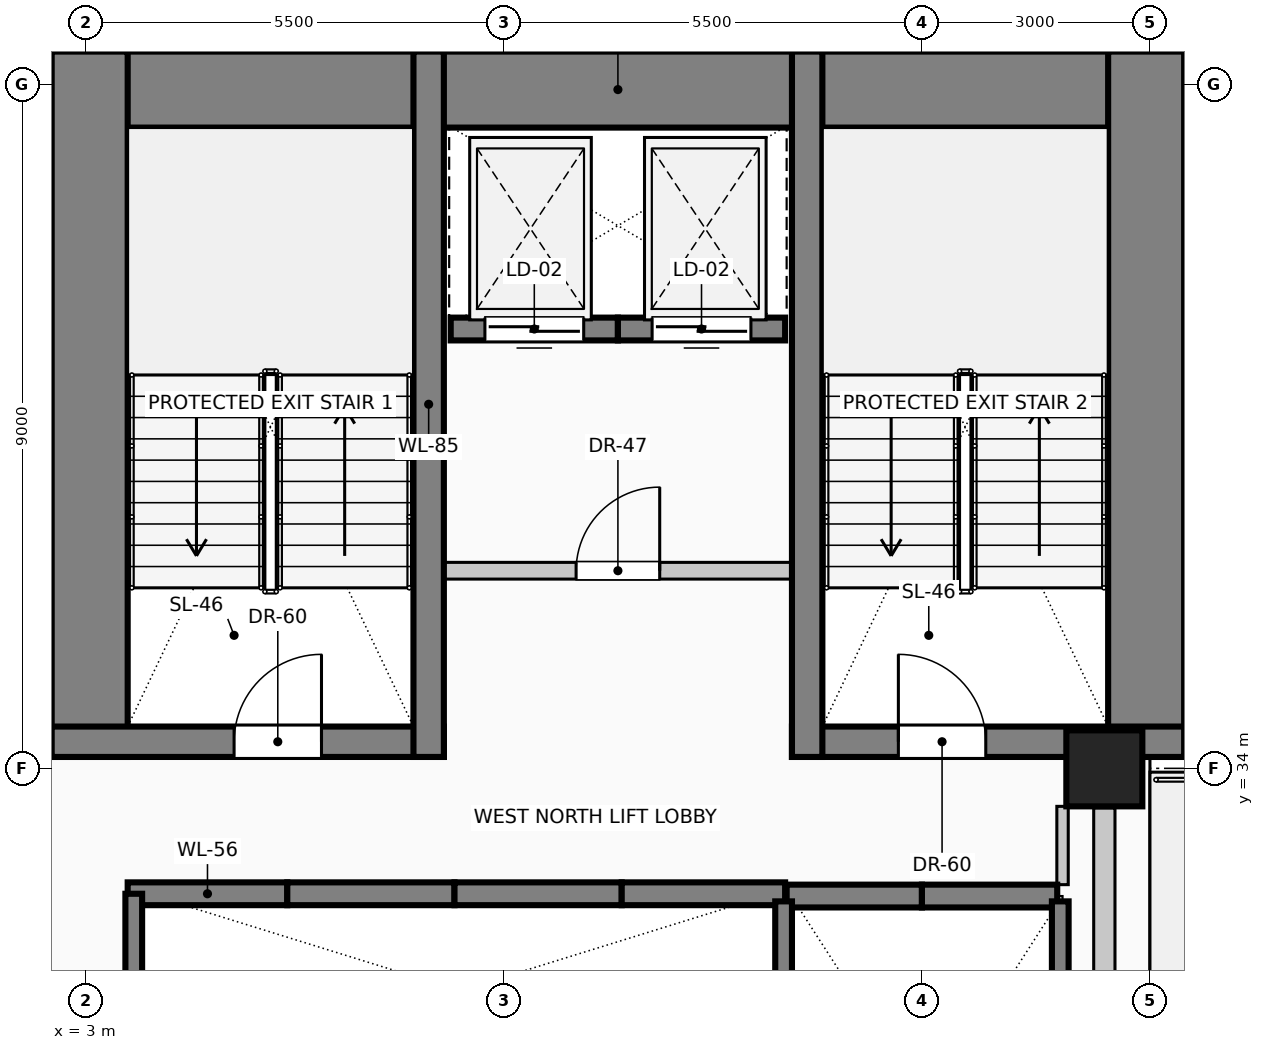
"""IFC4 building model, lengths in metres.
Left out: names, types, materials, properties, quantities, classifications, styles, units other than length and angle.
Written with IfcOpenShell. Run it as: python <this file> out.ifc"""

import sys

from ifc_helpers import new_model, si_unit, direction, frame, frame_2d, origin, origin_2d, place, context, subcontext, project, spatial, rectangle, circle, extrude, element, fill, save


model = new_model("IFC4")
c1 = context("Model", 3, precision=1e-05, world=origin(), true_north=direction((0.0, 1.0)))
c2 = subcontext(c1, "Body", "Model", "MODEL_VIEW")
j1 = project(units=[si_unit("LENGTHUNIT", "METRE"), si_unit("PLANEANGLEUNIT", "RADIAN")], contexts=[c1])
p1 = place(None, origin())
s1 = spatial("IfcSite", under=j1, at=p1, CompositionType="ELEMENT")
p2 = place(p1, origin())
s2 = spatial("IfcBuilding", under=s1, at=p2, CompositionType="ELEMENT")
p3 = place(p2, frame((0.0, 0.0, 38.6)))
s3 = spatial("IfcBuildingStorey", under=s2, at=p3, CompositionType="ELEMENT", Elevation=38.6)
p4 = place(p3, frame((2.55, 42.93, 0.0), z_axis=(0.0, 0.0, 1.0), x_axis=(1.0, 0.0, 0.0)))
e1 = element("IfcWall", 1, at=p4, inside=s3, PredefinedType="SHEAR", context=c2, shape_type="SweptSolid", body=[
    extrude(rectangle(XDim=14.9, YDim=1.0, at=frame_2d((7.45, 0.0))), origin(), (0.0, 0.0, 1.0), 4.0),
])
for number, where, z_axis, x_axis in (
    (2, (3.05, 34.15, 0.0), (0.0, 0.0, 1.0), (0.0, 1.0, 0.0)),
    (3, (16.95, 34.15, 0.0), (0.0, 0.0, 1.0), (0.0, 1.0, 0.0)),
):
    element("IfcWall", number, at=place(p3, frame(where, z_axis=z_axis, x_axis=x_axis)), inside=s3, PredefinedType="SHEAR", context=c2, shape_type="SweptSolid", body=[
        extrude(rectangle(XDim=9.28, YDim=1.0, at=frame_2d((4.64, 0.0))), origin(), (0.0, 0.0, 1.0), 4.0),
    ])
p5 = place(p3, frame((2.55, 34.35, 0.0), z_axis=(0.0, 0.0, 1.0), x_axis=(1.0, 0.0, 0.0)))
e4 = element("IfcWall", 4, at=p5, inside=s3, PredefinedType="SHEAR", context=c2, shape_type="SweptSolid", body=[
    extrude(rectangle(XDim=5.16, YDim=0.4, at=frame_2d((2.58, 0.0))), origin(), (0.0, 0.0, 1.0), 4.0),
])
p6 = place(p5, frame((2.4, 0.0, 0.0)))
e5 = element("IfcOpeningElement", 5, at=p6, cuts=e4, PredefinedType="OPENING", context=c2, shape_type="SweptSolid", body=[
    extrude(rectangle(XDim=1.15, YDim=2.2, at=frame_2d((0.575, 1.1))), frame((0.0, 0.21, 0.0), z_axis=(0.0, -1.0, 0.0), x_axis=(1.0, 0.0, 0.0)), (0.0, 0.0, 1.0), 0.42),
])
p7 = place(p3, frame((12.29, 34.35, 0.0), z_axis=(0.0, 0.0, 1.0), x_axis=(1.0, 0.0, 0.0)))
e6 = element("IfcWall", 6, at=p7, inside=s3, PredefinedType="SHEAR", context=c2, shape_type="SweptSolid", body=[
    extrude(rectangle(XDim=5.16, YDim=0.4, at=frame_2d((2.58, 0.0))), origin(), (0.0, 0.0, 1.0), 4.0),
])
p8 = place(p7, frame((1.4, 0.0, 0.0)))
e7 = element("IfcOpeningElement", 7, at=p8, cuts=e6, PredefinedType="OPENING", context=c2, shape_type="SweptSolid", body=[
    extrude(rectangle(XDim=1.15, YDim=2.2, at=frame_2d((0.575, 1.1))), frame((0.0, 0.21, 0.0), z_axis=(0.0, -1.0, 0.0), x_axis=(1.0, 0.0, 0.0)), (0.0, 0.0, 1.0), 0.42),
])
for number, where, z_axis, x_axis in (
    (8, (7.51, 34.15, 0.0), (0.0, 0.0, 1.0), (0.0, 1.0, 0.0)),
    (9, (12.49, 34.15, 0.0), (0.0, 0.0, 1.0), (0.0, 1.0, 0.0)),
):
    element("IfcWall", number, at=place(p3, frame(where, z_axis=z_axis, x_axis=x_axis)), inside=s3, PredefinedType="SHEAR", context=c2, shape_type="SweptSolid", body=[
        extrude(rectangle(XDim=9.28, YDim=0.4, at=frame_2d((4.64, 0.0))), origin(), (0.0, 0.0, 1.0), 4.0),
    ])
p9 = place(p3, frame((16.4, 34.0, 0.0), z_axis=(0.0, 0.0, 1.0), x_axis=(1.0, 0.0, 0.0)))
e10 = element("IfcColumn", 10, at=p9, inside=s3, PredefinedType="COLUMN", context=c2, shape_type="SweptSolid", body=[
    extrude(circle(Radius=0.5, at=origin_2d()), origin(), (0.0, 0.0, 1.0), 4.0),
])
p10 = place(p3, frame((16.4, 33.48, 0.0), z_axis=(0.0, 0.0, 1.0), x_axis=(0.0, -1.0, 0.0)))
e11 = element("IfcWall", 11, at=p10, inside=s3, PredefinedType="SOLIDWALL", context=c2, shape_type="SweptSolid", body=[
    extrude(rectangle(XDim=6.71, YDim=0.28, at=frame_2d((3.355, 0.0))), origin(), (0.0, 0.0, 1.0), 3.0),
])
for number, where, z_axis, x_axis in (
    (12, (12.22, 32.32, 0.0), (0.0, 0.0, 1.0), (1.0, 0.0, 0.0)),
    (13, (14.0, 32.32, 0.0), (0.0, 0.0, 1.0), (1.0, 0.0, 0.0)),
):
    element("IfcWall", number, at=place(p3, frame(where, z_axis=z_axis, x_axis=x_axis)), inside=s3, PredefinedType="SOLIDWALL", context=c2, shape_type="SweptSolid", body=[
        extrude(rectangle(XDim=1.78, YDim=0.3, at=frame_2d((0.89, 0.0))), origin(), (0.0, 0.0, 1.0), 4.0),
    ])
p11 = place(p3, frame((3.55, 32.35, 0.0), z_axis=(0.0, 0.0, 1.0), x_axis=(1.0, 0.0, 0.0)))
e14 = element("IfcWall", 14, at=p11, inside=s3, PredefinedType="SOLIDWALL", context=c2, shape_type="SweptSolid", body=[
    extrude(rectangle(XDim=2.1, YDim=0.3, at=frame_2d((1.05, 0.0))), origin(), (0.0, 0.0, 1.0), 4.0),
])
p12 = place(p3, frame((5.65, 32.35, 0.0), z_axis=(0.0, 0.0, 1.0), x_axis=(1.0, 0.0, 0.0)))
e15 = element("IfcWall", 15, at=p12, inside=s3, PredefinedType="SOLIDWALL", context=c2, shape_type="SweptSolid", body=[
    extrude(rectangle(XDim=2.2, YDim=0.3, at=frame_2d((1.1, 0.0))), origin(), (0.0, 0.0, 1.0), 4.0),
])
p13 = place(p3, frame((7.85, 32.35, 0.0), z_axis=(0.0, 0.0, 1.0), x_axis=(1.0, 0.0, 0.0)))
e16 = element("IfcWall", 16, at=p13, inside=s3, PredefinedType="SOLIDWALL", context=c2, shape_type="SweptSolid", body=[
    extrude(rectangle(XDim=2.2, YDim=0.3, at=frame_2d((1.1, 0.0))), origin(), (0.0, 0.0, 1.0), 4.0),
])
p14 = place(p3, frame((10.05, 32.35, 0.0), z_axis=(0.0, 0.0, 1.0), x_axis=(1.0, 0.0, 0.0)))
e17 = element("IfcWall", 17, at=p14, inside=s3, PredefinedType="SOLIDWALL", context=c2, shape_type="SweptSolid", body=[
    extrude(rectangle(XDim=2.15, YDim=0.3, at=frame_2d((1.075, 0.0))), origin(), (0.0, 0.0, 1.0), 4.0),
])
p15 = place(p3, frame((10.0, 39.78, 0.0), z_axis=(0.0, 0.0, 1.0), x_axis=(-1.0, 0.0, 0.0)))
e18 = element("IfcWall", 18, at=p15, inside=s3, PredefinedType="SOLIDWALL", context=c2, shape_type="SweptSolid", body=[
    extrude(rectangle(XDim=2.2, YDim=0.3, at=frame_2d((1.1, 0.0))), origin(), (0.0, 0.0, 1.0), 4.0),
])
p16 = place(p15, frame((0.45, 0.0, 0.0)))
e19 = element("IfcOpeningElement", 19, at=p16, cuts=e18, PredefinedType="OPENING", context=c2, shape_type="SweptSolid", body=[
    extrude(rectangle(XDim=1.3, YDim=2.25, at=frame_2d((0.65, 1.125))), frame((0.0, 0.16, 0.0), z_axis=(0.0, -1.0, 0.0), x_axis=(1.0, 0.0, 0.0)), (0.0, 0.0, 1.0), 0.32),
])
p17 = place(p3, frame((12.2, 39.78, 0.0), z_axis=(0.0, 0.0, 1.0), x_axis=(-1.0, 0.0, 0.0)))
e20 = element("IfcWall", 20, at=p17, inside=s3, PredefinedType="SOLIDWALL", context=c2, shape_type="SweptSolid", body=[
    extrude(rectangle(XDim=2.2, YDim=0.3, at=frame_2d((1.1, 0.0))), origin(), (0.0, 0.0, 1.0), 4.0),
])
p18 = place(p17, frame((0.45, 0.0, 0.0)))
e21 = element("IfcOpeningElement", 21, at=p18, cuts=e20, PredefinedType="OPENING", context=c2, shape_type="SweptSolid", body=[
    extrude(rectangle(XDim=1.3, YDim=2.25, at=frame_2d((0.65, 1.125))), frame((0.0, 0.16, 0.0), z_axis=(0.0, -1.0, 0.0), x_axis=(1.0, 0.0, 0.0)), (0.0, 0.0, 1.0), 0.32),
])
p19 = place(p3, frame((3.63, 26.8, 0.0), z_axis=(0.0, 0.0, 1.0), x_axis=(0.0, 1.0, 0.0)))
e22 = element("IfcWall", 22, at=p19, inside=s3, PredefinedType="SOLIDWALL", context=c2, shape_type="SweptSolid", body=[
    extrude(rectangle(XDim=5.55, YDim=0.22, at=frame_2d((2.775, 0.0))), origin(), (0.0, 0.0, 1.0), 4.0),
])
for number, where, z_axis, x_axis in (
    (23, (12.18, 26.8, 0.0), (0.0, 0.0, 1.0), (0.0, 1.0, 0.0)),
    (24, (15.82, 26.8, 0.0), (0.0, 0.0, 1.0), (0.0, 1.0, 0.0)),
):
    element("IfcWall", number, at=place(p3, frame(where, z_axis=z_axis, x_axis=x_axis)), inside=s3, PredefinedType="SOLIDWALL", context=c2, shape_type="SweptSolid", body=[
        extrude(rectangle(XDim=5.45, YDim=0.22, at=frame_2d((2.725, 0.0))), origin(), (0.0, 0.0, 1.0), 4.0),
    ])
p20 = place(p3, frame((7.51, 36.6, 0.0), z_axis=(0.0, 0.0, 1.0), x_axis=(1.0, 0.0, 0.0)))
e25 = element("IfcWall", 25, at=p20, inside=s3, PredefinedType="PARTITIONING", context=c2, shape_type="SweptSolid", body=[
    extrude(rectangle(XDim=4.98, YDim=0.22, at=frame_2d((2.49, 0.0))), origin(), (0.0, 0.0, 1.0), 3.7),
])
p21 = place(p20, frame((1.94, 0.0, 0.0)))
e26 = element("IfcOpeningElement", 26, at=p21, cuts=e25, PredefinedType="OPENING", context=c2, shape_type="SweptSolid", body=[
    extrude(rectangle(XDim=1.1, YDim=2.2, at=frame_2d((0.55, 1.1))), frame((0.0, 0.12, 0.0), z_axis=(0.0, -1.0, 0.0), x_axis=(1.0, 0.0, 0.0)), (0.0, 0.0, 1.0), 0.24),
])
p22 = place(p3, frame((15.85, 32.47, 0.0), z_axis=(0.0, 0.0, 1.0), x_axis=(0.0, 1.0, 0.0)))
e27 = element("IfcWall", 27, at=p22, inside=s3, PredefinedType="PARTITIONING", context=c2, shape_type="SweptSolid", body=[
    extrude(rectangle(XDim=1.03, YDim=0.15, at=frame_2d((0.515, 0.0))), origin(), (0.0, 0.0, 1.0), 3.7),
])
p23 = place(p16, origin())
e28 = element("IfcDoor", 28, at=p23, inside=s3, OperationType="SLIDING_TO_LEFT", PredefinedType="DOOR", context=c2, shape_type="SweptSolid", body=[
    extrude(rectangle(XDim=1.3, YDim=2.25, at=frame_2d((0.65, 1.125))), frame((0.0, 0.025, 0.0), z_axis=(0.0, -1.0, 0.0), x_axis=(1.0, 0.0, 0.0)), (0.0, 0.0, 1.0), 0.05),
])
fill(e19, e28)
p24 = place(p18, origin())
e29 = element("IfcDoor", 29, at=p24, inside=s3, OperationType="SLIDING_TO_RIGHT", PredefinedType="DOOR", context=c2, shape_type="SweptSolid", body=[
    extrude(rectangle(XDim=1.3, YDim=2.25, at=frame_2d((0.65, 1.125))), frame((0.0, 0.025, 0.0), z_axis=(0.0, -1.0, 0.0), x_axis=(1.0, 0.0, 0.0)), (0.0, 0.0, 1.0), 0.05),
])
fill(e21, e29)
p25 = place(p6, origin())
e30 = element("IfcDoor", 30, at=p25, inside=s3, OperationType="SINGLE_SWING_RIGHT", PredefinedType="DOOR", context=c2, shape_type="SweptSolid", body=[
    extrude(rectangle(XDim=1.15, YDim=2.2, at=frame_2d((0.575, 1.1))), frame((0.0, 0.025, 0.0), z_axis=(0.0, -1.0, 0.0), x_axis=(1.0, 0.0, 0.0)), (0.0, 0.0, 1.0), 0.05),
])
fill(e5, e30)
p26 = place(p8, origin())
e31 = element("IfcDoor", 31, at=p26, inside=s3, OperationType="SINGLE_SWING_LEFT", PredefinedType="DOOR", context=c2, shape_type="SweptSolid", body=[
    extrude(rectangle(XDim=1.15, YDim=2.2, at=frame_2d((0.575, 1.1))), frame((0.0, 0.025, 0.0), z_axis=(0.0, -1.0, 0.0), x_axis=(1.0, 0.0, 0.0)), (0.0, 0.0, 1.0), 0.05),
])
fill(e7, e31)
p27 = place(p21, origin())
e32 = element("IfcDoor", 32, at=p27, inside=s3, OperationType="SINGLE_SWING_RIGHT", PredefinedType="DOOR", context=c2, shape_type="SweptSolid", body=[
    extrude(rectangle(XDim=1.1, YDim=2.2, at=frame_2d((0.55, 1.1))), frame((0.0, 0.025, 0.0), z_axis=(0.0, -1.0, 0.0), x_axis=(1.0, 0.0, 0.0)), (0.0, 0.0, 1.0), 0.05),
])
fill(e26, e32)
save(model, sys.argv[1])
